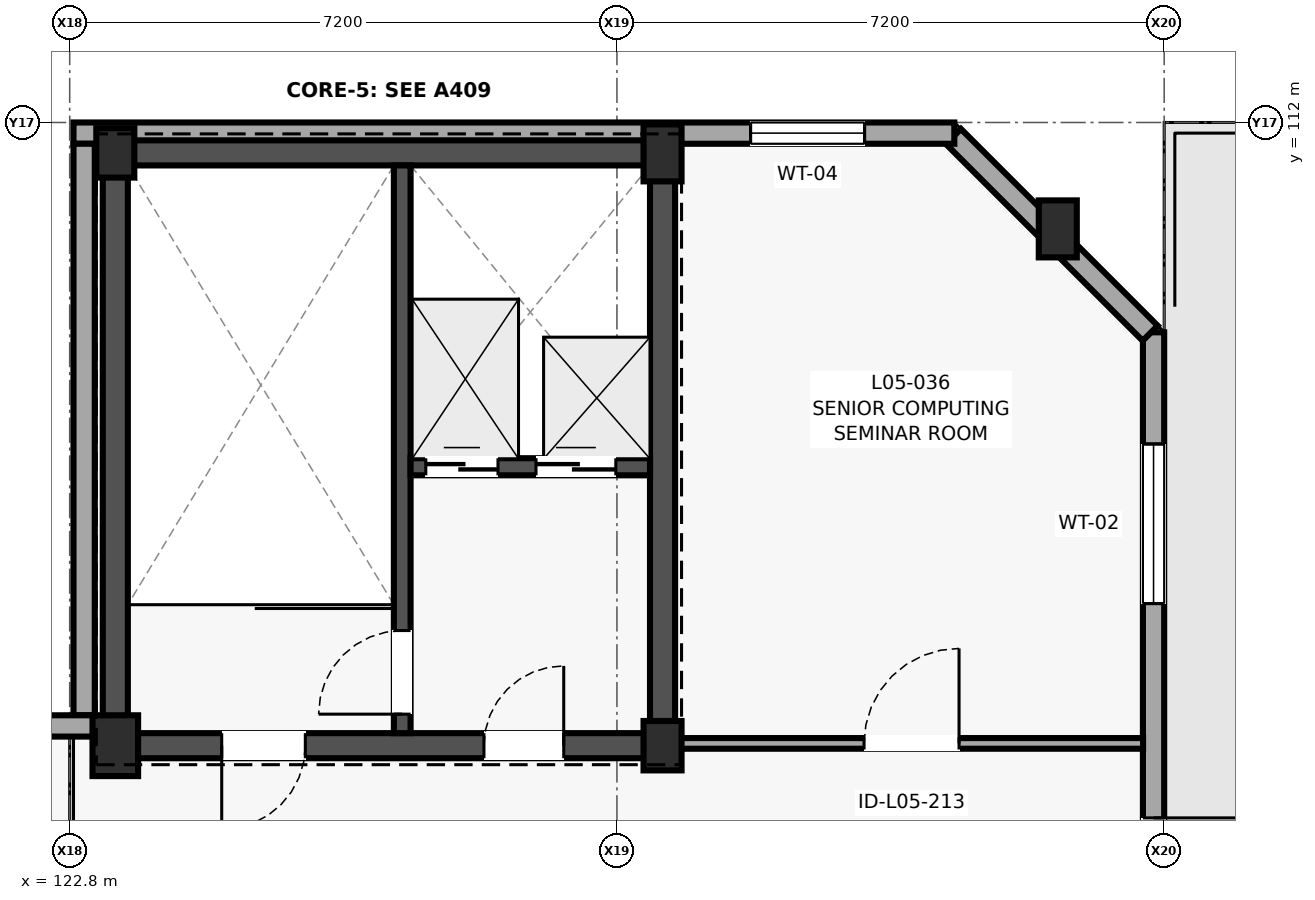
"""IFC4 building model, lengths in metres.
Left out: names, types, materials, properties, quantities, classifications, styles, units other than length and angle.
Written with IfcOpenShell. Run it as: python <this file> out.ifc"""

import sys

from ifc_helpers import new_model, si_unit, direction, frame, frame_2d, origin, origin_2d, place, context, subcontext, project, spatial, polyline, rectangle, outline, extrude, element, fill, save


model = new_model("IFC4")
c1 = context("Model", 3, precision=1e-05, world=origin(), true_north=direction((0.0, 1.0)))
c2 = subcontext(c1, "Body", "Model", "MODEL_VIEW")
j1 = project(units=[si_unit("LENGTHUNIT", "METRE"), si_unit("PLANEANGLEUNIT", "RADIAN")], contexts=[c1])
p1 = place(None, origin())
s1 = spatial("IfcSite", under=j1, at=p1, CompositionType="ELEMENT")
p2 = place(p1, origin())
s2 = spatial("IfcBuilding", under=s1, at=p2, CompositionType="ELEMENT")
p3 = place(p2, frame((0.0, 0.0, 20.2)))
s3 = spatial("IfcBuildingStorey", under=s2, at=p3, CompositionType="ELEMENT", Elevation=20.2)
p4 = place(p3, frame((123.4, 103.8, 0.0), z_axis=(0.0, 0.0, 1.0), x_axis=(1.0, 0.0, 0.0)))
e1 = element("IfcColumn", 1, at=p4, inside=s3, PredefinedType="COLUMN", context=c2, shape_type="SweptSolid", body=[
    extrude(rectangle(XDim=0.6, YDim=0.8, at=origin_2d()), origin(), (0.0, 0.0, 1.0), 4.0),
])
for number, where, z_axis, x_axis in (
    (2, (123.4, 111.6, 0.0), (0.0, 0.0, 1.0), (1.0, 0.0, 0.0)),
    (3, (130.6, 103.8, 0.0), (0.0, 0.0, 1.0), (1.0, 0.0, 0.0)),
):
    element("IfcColumn", number, at=place(p3, frame(where, z_axis=z_axis, x_axis=x_axis)), inside=s3, PredefinedType="COLUMN", context=c2, shape_type="SweptSolid", body=[
        extrude(rectangle(XDim=0.5, YDim=0.65, at=origin_2d()), origin(), (0.0, 0.0, 1.0), 4.0),
    ])
for number, where, z_axis, x_axis in (
    (4, (130.6, 111.6, 0.0), (0.0, 0.0, 1.0), (1.0, 0.0, 0.0)),
    (5, (135.8, 110.6, 0.0), (0.0, 0.0, 1.0), (1.0, 0.0, 0.0)),
):
    element("IfcColumn", number, at=place(p3, frame(where, z_axis=z_axis, x_axis=x_axis)), inside=s3, PredefinedType="COLUMN", context=c2, shape_type="SweptSolid", body=[
        extrude(rectangle(XDim=0.5, YDim=0.75, at=origin_2d()), origin(), (0.0, 0.0, 1.0), 4.0),
    ])
p5 = place(p3, frame((137.06, 99.161, 0.0), z_axis=(0.0, 0.0, 1.0), x_axis=(0.0, 1.0, 0.0)))
e6 = element("IfcWall", 6, at=p5, inside=s3, PredefinedType="SOLIDWALL", context=c2, shape_type="SweptSolid", body=[
    extrude(rectangle(XDim=10.078, YDim=0.28, at=frame_2d((5.039, 0.0))), origin(), (0.0, 0.0, 1.0), 3.78),
])
p6 = place(p5, frame((2.589, 0.0, 0.0)))
e7 = element("IfcOpeningElement", 7, at=p6, cuts=e6, PredefinedType="OPENING", context=c2, shape_type="SweptSolid", body=[
    extrude(rectangle(XDim=1.1, YDim=2.15, at=frame_2d((0.55, 1.075))), frame((0.0, 0.15, 0.0), z_axis=(0.0, -1.0, 0.0), x_axis=(1.0, 0.0, 0.0)), (0.0, 0.0, 1.0), 0.3),
])
p7 = place(p5, frame((6.509, 0.0, 0.85)))
e8 = element("IfcOpeningElement", 8, at=p7, cuts=e6, PredefinedType="OPENING", context=c2, shape_type="SweptSolid", body=[
    extrude(rectangle(XDim=2.1, YDim=1.8, at=frame_2d((1.05, 0.9))), frame((0.0, 0.15, 0.0), z_axis=(0.0, -1.0, 0.0), x_axis=(1.0, 0.0, 0.0)), (0.0, 0.0, 1.0), 0.3),
])
p8 = place(p3, frame((137.016, 109.227, 0.0), z_axis=(0.0, 0.0, 1.0), x_axis=(-0.70714012034, 0.707073440461, 0.0)))
e9 = element("IfcWall", 9, at=p8, inside=s3, PredefinedType="SOLIDWALL", context=c2, shape_type="SweptSolid", body=[
    extrude(rectangle(XDim=3.661, YDim=0.28, at=frame_2d((1.831, 0.0))), origin(), (0.0, 0.0, 1.0), 3.78),
])
p9 = place(p3, frame((134.439, 111.86, 0.0), z_axis=(0.0, 0.0, 1.0), x_axis=(-1.0, 0.0, 0.0)))
e10 = element("IfcWall", 10, at=p9, inside=s3, PredefinedType="SOLIDWALL", context=c2, shape_type="SweptSolid", body=[
    extrude(rectangle(XDim=11.589, YDim=0.28, at=frame_2d((5.794, 0.0))), origin(), (0.0, 0.0, 1.0), 3.78),
])
p10 = place(p9, frame((1.181, 0.0, 0.85)))
e11 = element("IfcOpeningElement", 11, at=p10, cuts=e10, PredefinedType="OPENING", context=c2, shape_type="SweptSolid", body=[
    extrude(rectangle(XDim=1.5, YDim=1.65, at=frame_2d((0.75, 0.825))), frame((0.0, 0.15, 0.0), z_axis=(0.0, -1.0, 0.0), x_axis=(1.0, 0.0, 0.0)), (0.0, 0.0, 1.0), 0.3),
])
p11 = place(p3, frame((122.99, 111.72, 0.0), z_axis=(0.0, 0.0, 1.0), x_axis=(0.0, -1.0, 0.0)))
e12 = element("IfcWall", 12, at=p11, inside=s3, PredefinedType="SOLIDWALL", context=c2, shape_type="SweptSolid", body=[
    extrude(rectangle(XDim=7.52, YDim=0.28, at=frame_2d((3.76, 0.0))), origin(), (0.0, 0.0, 1.0), 3.78),
])
p12 = place(p3, frame((123.13, 104.06, 0.0), z_axis=(0.0, 0.0, 1.0), x_axis=(-1.0, 0.0, 0.0)))
e13 = element("IfcWall", 13, at=p12, inside=s3, PredefinedType="SOLIDWALL", context=c2, shape_type="SweptSolid", body=[
    extrude(rectangle(XDim=7.53, YDim=0.28, at=frame_2d((3.765, 0.0))), origin(), (0.0, 0.0, 1.0), 3.78),
])
p13 = place(p12, frame((1.158, 0.0, 0.85)))
e14 = element("IfcOpeningElement", 14, at=p13, cuts=e13, PredefinedType="OPENING", context=c2, shape_type="SweptSolid", body=[
    extrude(rectangle(XDim=1.45, YDim=1.7, at=frame_2d((0.725, 0.85))), frame((0.0, 0.15, 0.0), z_axis=(0.0, -1.0, 0.0), x_axis=(1.0, 0.0, 0.0)), (0.0, 0.0, 1.0), 0.3),
])
p14 = place(p12, frame((5.098, 0.0, 0.75)))
e15 = element("IfcOpeningElement", 15, at=p14, cuts=e13, PredefinedType="OPENING", context=c2, shape_type="SweptSolid", body=[
    extrude(rectangle(XDim=1.1, YDim=2.1, at=frame_2d((0.55, 1.05))), frame((0.0, 0.15, 0.0), z_axis=(0.0, -1.0, 0.0), x_axis=(1.0, 0.0, 0.0)), (0.0, 0.0, 1.0), 0.3),
])
p15 = place(p3, frame((122.702, 80.045, 4.0), z_axis=(0.0, 0.0, 1.0), x_axis=(0.0, 1.0, 0.0)))
e16 = element("IfcWall", 16, at=p15, inside=s3, PredefinedType="PARAPET", context=c2, shape_type="SweptSolid", body=[
    extrude(outline(polyline([(0.0, 0.0), (23.96, 0.0), (23.96, 1.12), (16.293, 1.12), (16.243, 1.46), (7.717, 1.46), (7.667, 1.12), (0.0, 1.12), (0.0, 0.0)])), frame((0.0, 0.098, 0.0), z_axis=(0.0, -1.0, 0.0), x_axis=(1.0, 0.0, 0.0)), (0.0, 0.0, 1.0), 0.195),
])
p16 = place(p3, frame((122.799, 104.102, 4.0), z_axis=(0.0, 0.0, 1.0), x_axis=(-1.0, 0.0, 0.0)))
e17 = element("IfcWall", 17, at=p16, inside=s3, PredefinedType="PARAPET", context=c2, shape_type="SweptSolid", body=[
    extrude(rectangle(XDim=7.199, YDim=0.195, at=frame_2d((3.6, 0.0))), origin(), (0.0, 0.0, 1.0), 1.12),
])
p17 = place(p3, frame((137.102, 99.161, 4.0), z_axis=(0.0, 0.0, 1.0), x_axis=(0.0, 1.0, 0.0)))
e18 = element("IfcWall", 18, at=p17, inside=s3, PredefinedType="PARAPET", context=c2, shape_type="SweptSolid", body=[
    extrude(outline(polyline([(0.0, 0.0), (10.078, 0.0), (10.078, 1.12), (6.853, 1.12), (6.803, 1.46), (3.275, 1.46), (3.225, 1.12), (0.0, 1.12), (0.0, 0.0)])), frame((0.0, 0.098, 0.0), z_axis=(0.0, -1.0, 0.0), x_axis=(1.0, 0.0, 0.0)), (0.0, 0.0, 1.0), 0.195),
])
p18 = place(p3, frame((137.073, 109.229, 4.0), z_axis=(0.0, 0.0, 1.0), x_axis=(-0.707106781187, 0.707106781187, 0.0)))
e19 = element("IfcWall", 19, at=p18, inside=s3, PredefinedType="PARAPET", context=c2, shape_type="SweptSolid", body=[
    extrude(rectangle(XDim=3.739, YDim=0.165, at=frame_2d((1.87, 0.0))), origin(), (0.0, 0.0, 1.0), 1.12),
])
p19 = place(p3, frame((134.439, 111.902, 4.0), z_axis=(0.0, 0.0, 1.0), x_axis=(-1.0, 0.0, 0.0)))
e20 = element("IfcWall", 20, at=p19, inside=s3, PredefinedType="PARAPET", context=c2, shape_type="SweptSolid", body=[
    extrude(rectangle(XDim=3.674, YDim=0.165, at=frame_2d((1.837, 0.0))), origin(), (0.0, 0.0, 1.0), 1.12),
])
p20 = place(p3, frame((126.955, 111.902, 4.0), z_axis=(0.0, 0.0, 1.0), x_axis=(-1.0, 0.0, 0.0)))
e21 = element("IfcWall", 21, at=p20, inside=s3, PredefinedType="PARAPET", context=c2, shape_type="SweptSolid", body=[
    extrude(rectangle(XDim=4.105, YDim=0.165, at=frame_2d((2.052, 0.0))), origin(), (0.0, 0.0, 1.0), 1.12),
])
p21 = place(p3, frame((122.948, 111.805, 4.0), z_axis=(0.0, 0.0, 1.0), x_axis=(0.0, -1.0, 0.0)))
e22 = element("IfcWall", 22, at=p21, inside=s3, PredefinedType="PARAPET", context=c2, shape_type="SweptSolid", body=[
    extrude(outline(polyline([(0.0, 0.0), (15.209, 0.0), (15.209, 1.12), (10.342, 1.12), (10.292, 1.46), (4.917, 1.46), (4.867, 1.12), (0.0, 1.12), (0.0, 0.0)])), frame((0.0, 0.098, 0.0), z_axis=(0.0, -1.0, 0.0), x_axis=(1.0, 0.0, 0.0)), (0.0, 0.0, 1.0), 0.195),
])
p22 = place(p3, frame((123.235, 103.8, 0.0), z_axis=(0.0, 0.0, 1.0), x_axis=(1.0, 0.0, 0.0)))
e23 = element("IfcWall", 23, at=p22, inside=s3, PredefinedType="SHEAR", context=c2, shape_type="SweptSolid", body=[
    extrude(rectangle(XDim=7.53, YDim=0.33, at=frame_2d((3.765, 0.0))), origin(), (0.0, 0.0, 1.0), 4.0),
])
p23 = place(p22, frame((5.015, 0.0, 0.0)))
e24 = element("IfcOpeningElement", 24, at=p23, cuts=e23, PredefinedType="OPENING", context=c2, shape_type="SweptSolid", body=[
    extrude(rectangle(XDim=1.05, YDim=2.15, at=frame_2d((0.525, 1.075))), frame((0.0, 0.175, 0.0), z_axis=(0.0, -1.0, 0.0), x_axis=(1.0, 0.0, 0.0)), (0.0, 0.0, 1.0), 0.35),
])
p24 = place(p22, frame((1.565, 0.0, 0.0)))
e25 = element("IfcOpeningElement", 25, at=p24, cuts=e23, PredefinedType="OPENING", context=c2, shape_type="SweptSolid", body=[
    extrude(rectangle(XDim=1.1, YDim=2.15, at=frame_2d((0.55, 1.075))), frame((0.0, 0.175, 0.0), z_axis=(0.0, -1.0, 0.0), x_axis=(1.0, 0.0, 0.0)), (0.0, 0.0, 1.0), 0.35),
])
p25 = place(p3, frame((123.235, 111.6, 0.0), z_axis=(0.0, 0.0, 1.0), x_axis=(1.0, 0.0, 0.0)))
e26 = element("IfcWall", 26, at=p25, inside=s3, PredefinedType="SHEAR", context=c2, shape_type="SweptSolid", body=[
    extrude(rectangle(XDim=7.53, YDim=0.33, at=frame_2d((3.765, 0.0))), origin(), (0.0, 0.0, 1.0), 4.0),
])
for number, where, z_axis, x_axis in (
    (27, (123.4, 103.965, 0.0), (0.0, 0.0, 1.0), (0.0, 1.0, 0.0)),
    (28, (130.6, 103.965, 0.0), (0.0, 0.0, 1.0), (0.0, 1.0, 0.0)),
):
    element("IfcWall", number, at=place(p3, frame(where, z_axis=z_axis, x_axis=x_axis)), inside=s3, PredefinedType="SHEAR", context=c2, shape_type="SweptSolid", body=[
        extrude(rectangle(XDim=7.47, YDim=0.33, at=frame_2d((3.735, 0.0))), origin(), (0.0, 0.0, 1.0), 4.0),
    ])
p26 = place(p3, frame((127.175, 103.965, 0.0), z_axis=(0.0, 0.0, 1.0), x_axis=(0.0, 1.0, 0.0)))
e29 = element("IfcWall", 29, at=p26, inside=s3, PredefinedType="SHEAR", context=c2, shape_type="SweptSolid", body=[
    extrude(rectangle(XDim=7.47, YDim=0.22, at=frame_2d((3.735, 0.0))), origin(), (0.0, 0.0, 1.0), 4.0),
])
p27 = place(p26, frame((0.25, 0.0, 0.0)))
e30 = element("IfcOpeningElement", 30, at=p27, cuts=e29, PredefinedType="OPENING", context=c2, shape_type="SweptSolid", body=[
    extrude(rectangle(XDim=1.1, YDim=2.15, at=frame_2d((0.55, 1.075))), frame((0.0, 0.12, 0.0), z_axis=(0.0, -1.0, 0.0), x_axis=(1.0, 0.0, 0.0)), (0.0, 0.0, 1.0), 0.24),
])
p28 = place(p3, frame((127.285, 107.47, 0.0), z_axis=(0.0, 0.0, 1.0), x_axis=(1.0, 0.0, 0.0)))
e31 = element("IfcWall", 31, at=p28, inside=s3, PredefinedType="SHEAR", context=c2, shape_type="SweptSolid", body=[
    extrude(rectangle(XDim=3.15, YDim=0.225, at=frame_2d((1.575, 0.0))), origin(), (0.0, 0.0, 1.0), 4.0),
])
p29 = place(p28, frame((0.2, 0.0, 0.0)))
e32 = element("IfcOpeningElement", 32, at=p29, cuts=e31, PredefinedType="OPENING", context=c2, shape_type="SweptSolid", body=[
    extrude(rectangle(XDim=0.95, YDim=2.15, at=frame_2d((0.475, 1.075))), frame((0.0, 0.123, 0.0), z_axis=(0.0, -1.0, 0.0), x_axis=(1.0, 0.0, 0.0)), (0.0, 0.0, 1.0), 0.245),
])
p30 = place(p28, frame((1.65, 0.0, 0.0)))
e33 = element("IfcOpeningElement", 33, at=p30, cuts=e31, PredefinedType="OPENING", context=c2, shape_type="SweptSolid", body=[
    extrude(rectangle(XDim=1.05, YDim=2.2, at=frame_2d((0.525, 1.1))), frame((0.0, 0.123, 0.0), z_axis=(0.0, -1.0, 0.0), x_axis=(1.0, 0.0, 0.0)), (0.0, 0.0, 1.0), 0.245),
])
for number, where, z_axis, x_axis in (
    (34, (126.955, 107.41, 4.0), (0.0, 0.0, 1.0), (1.0, 0.0, 0.0)),
    (35, (126.955, 111.6, 4.0), (0.0, 0.0, 1.0), (1.0, 0.0, 0.0)),
):
    element("IfcWall", number, at=place(p3, frame(where, z_axis=z_axis, x_axis=x_axis)), inside=s3, PredefinedType="SHEAR", context=c2, shape_type="SweptSolid", body=[
        extrude(rectangle(XDim=3.81, YDim=0.33, at=frame_2d((1.905, 0.0))), origin(), (0.0, 0.0, 1.0), 0.96),
    ])
for number, where, z_axis, x_axis in (
    (36, (127.12, 107.575, 4.0), (0.0, 0.0, 1.0), (0.0, 1.0, 0.0)),
    (37, (130.6, 107.575, 4.0), (0.0, 0.0, 1.0), (0.0, 1.0, 0.0)),
):
    element("IfcWall", number, at=place(p3, frame(where, z_axis=z_axis, x_axis=x_axis)), inside=s3, PredefinedType="SHEAR", context=c2, shape_type="SweptSolid", body=[
        extrude(rectangle(XDim=3.86, YDim=0.33, at=frame_2d((1.93, 0.0))), origin(), (0.0, 0.0, 1.0), 0.96),
    ])
p31 = place(p3, frame((130.83, 103.83, 0.0), z_axis=(0.0, 0.0, 1.0), x_axis=(1.0, 0.0, 0.0)))
e38 = element("IfcWall", 38, at=p31, inside=s3, PredefinedType="PARTITIONING", context=c2, shape_type="SweptSolid", body=[
    extrude(rectangle(XDim=6.092, YDim=0.14, at=frame_2d((3.046, 0.0))), origin(), (0.0, 0.0, 1.0), 3.755),
])
p32 = place(p31, frame((2.421, 0.0, 0.0)))
e39 = element("IfcOpeningElement", 39, at=p32, cuts=e38, PredefinedType="OPENING", context=c2, shape_type="SweptSolid", body=[
    extrude(rectangle(XDim=1.25, YDim=2.22, at=frame_2d((0.625, 1.11))), frame((0.0, 0.08, 0.0), z_axis=(0.0, -1.0, 0.0), x_axis=(1.0, 0.0, 0.0)), (0.0, 0.0, 1.0), 0.16),
])
p33 = place(p6, frame((1.1, 0.0, 0.0), z_axis=(0.0, 0.0, 1.0), x_axis=(-1.0, 0.0, 0.0)))
e40 = element("IfcDoor", 40, at=p33, inside=s3, OperationType="SINGLE_SWING_RIGHT", PredefinedType="DOOR", context=c2, shape_type="SweptSolid", body=[
    extrude(rectangle(XDim=1.1, YDim=2.15, at=frame_2d((0.55, 1.075))), frame((0.0, 0.025, 0.0), z_axis=(0.0, -1.0, 0.0), x_axis=(1.0, 0.0, 0.0)), (0.0, 0.0, 1.0), 0.05),
])
fill(e7, e40)
p34 = place(p7, origin())
e41 = element("IfcWindow", 41, at=p34, inside=s3, PartitioningType="SINGLE_PANEL", PredefinedType="WINDOW", context=c2, shape_type="SweptSolid", body=[
    extrude(rectangle(XDim=2.1, YDim=1.8, at=frame_2d((1.05, 0.9))), frame((0.0, 0.03, 0.0), z_axis=(0.0, -1.0, 0.0), x_axis=(1.0, 0.0, 0.0)), (0.0, 0.0, 1.0), 0.06),
])
fill(e8, e41)
p35 = place(p10, origin())
e42 = element("IfcWindow", 42, at=p35, inside=s3, PartitioningType="SINGLE_PANEL", PredefinedType="WINDOW", context=c2, shape_type="SweptSolid", body=[
    extrude(rectangle(XDim=1.5, YDim=1.65, at=frame_2d((0.75, 0.825))), frame((0.0, 0.03, 0.0), z_axis=(0.0, -1.0, 0.0), x_axis=(1.0, 0.0, 0.0)), (0.0, 0.0, 1.0), 0.06),
])
fill(e11, e42)
p36 = place(p29, origin())
e43 = element("IfcDoor", 43, at=p36, inside=s3, OperationType="SLIDING_TO_LEFT", PredefinedType="DOOR", context=c2, shape_type="SweptSolid", body=[
    extrude(rectangle(XDim=0.95, YDim=2.15, at=frame_2d((0.475, 1.075))), frame((0.0, 0.025, 0.0), z_axis=(0.0, -1.0, 0.0), x_axis=(1.0, 0.0, 0.0)), (0.0, 0.0, 1.0), 0.05),
])
fill(e32, e43)
p37 = place(p30, origin())
e44 = element("IfcDoor", 44, at=p37, inside=s3, OperationType="SLIDING_TO_RIGHT", PredefinedType="DOOR", context=c2, shape_type="SweptSolid", body=[
    extrude(rectangle(XDim=1.05, YDim=2.2, at=frame_2d((0.525, 1.1))), frame((0.0, 0.025, 0.0), z_axis=(0.0, -1.0, 0.0), x_axis=(1.0, 0.0, 0.0)), (0.0, 0.0, 1.0), 0.05),
])
fill(e33, e44)
p38 = place(p27, origin())
e45 = element("IfcDoor", 45, at=p38, inside=s3, OperationType="SINGLE_SWING_LEFT", PredefinedType="DOOR", context=c2, shape_type="SweptSolid", body=[
    extrude(rectangle(XDim=1.1, YDim=2.15, at=frame_2d((0.55, 1.075))), frame((0.0, 0.025, 0.0), z_axis=(0.0, -1.0, 0.0), x_axis=(1.0, 0.0, 0.0)), (0.0, 0.0, 1.0), 0.05),
])
fill(e30, e45)
p39 = place(p23, origin())
e46 = element("IfcDoor", 46, at=p39, inside=s3, OperationType="SINGLE_SWING_RIGHT", PredefinedType="DOOR", context=c2, shape_type="SweptSolid", body=[
    extrude(rectangle(XDim=1.05, YDim=2.15, at=frame_2d((0.525, 1.075))), frame((0.0, 0.025, 0.0), z_axis=(0.0, -1.0, 0.0), x_axis=(1.0, 0.0, 0.0)), (0.0, 0.0, 1.0), 0.05),
])
fill(e24, e46)
p40 = place(p24, frame((1.1, 0.0, 0.0), z_axis=(0.0, 0.0, 1.0), x_axis=(-1.0, 0.0, 0.0)))
e47 = element("IfcDoor", 47, at=p40, inside=s3, OperationType="SINGLE_SWING_LEFT", PredefinedType="DOOR", context=c2, shape_type="SweptSolid", body=[
    extrude(rectangle(XDim=1.1, YDim=2.15, at=frame_2d((0.55, 1.075))), frame((0.0, 0.025, 0.0), z_axis=(0.0, -1.0, 0.0), x_axis=(1.0, 0.0, 0.0)), (0.0, 0.0, 1.0), 0.05),
])
fill(e25, e47)
p41 = place(p32, origin())
e48 = element("IfcDoor", 48, at=p41, inside=s3, OperationType="SINGLE_SWING_RIGHT", PredefinedType="DOOR", context=c2, shape_type="SweptSolid", body=[
    extrude(rectangle(XDim=1.25, YDim=2.22, at=frame_2d((0.625, 1.11))), frame((0.0, 0.025, 0.0), z_axis=(0.0, -1.0, 0.0), x_axis=(1.0, 0.0, 0.0)), (0.0, 0.0, 1.0), 0.05),
])
fill(e39, e48)
save(model, sys.argv[1])
